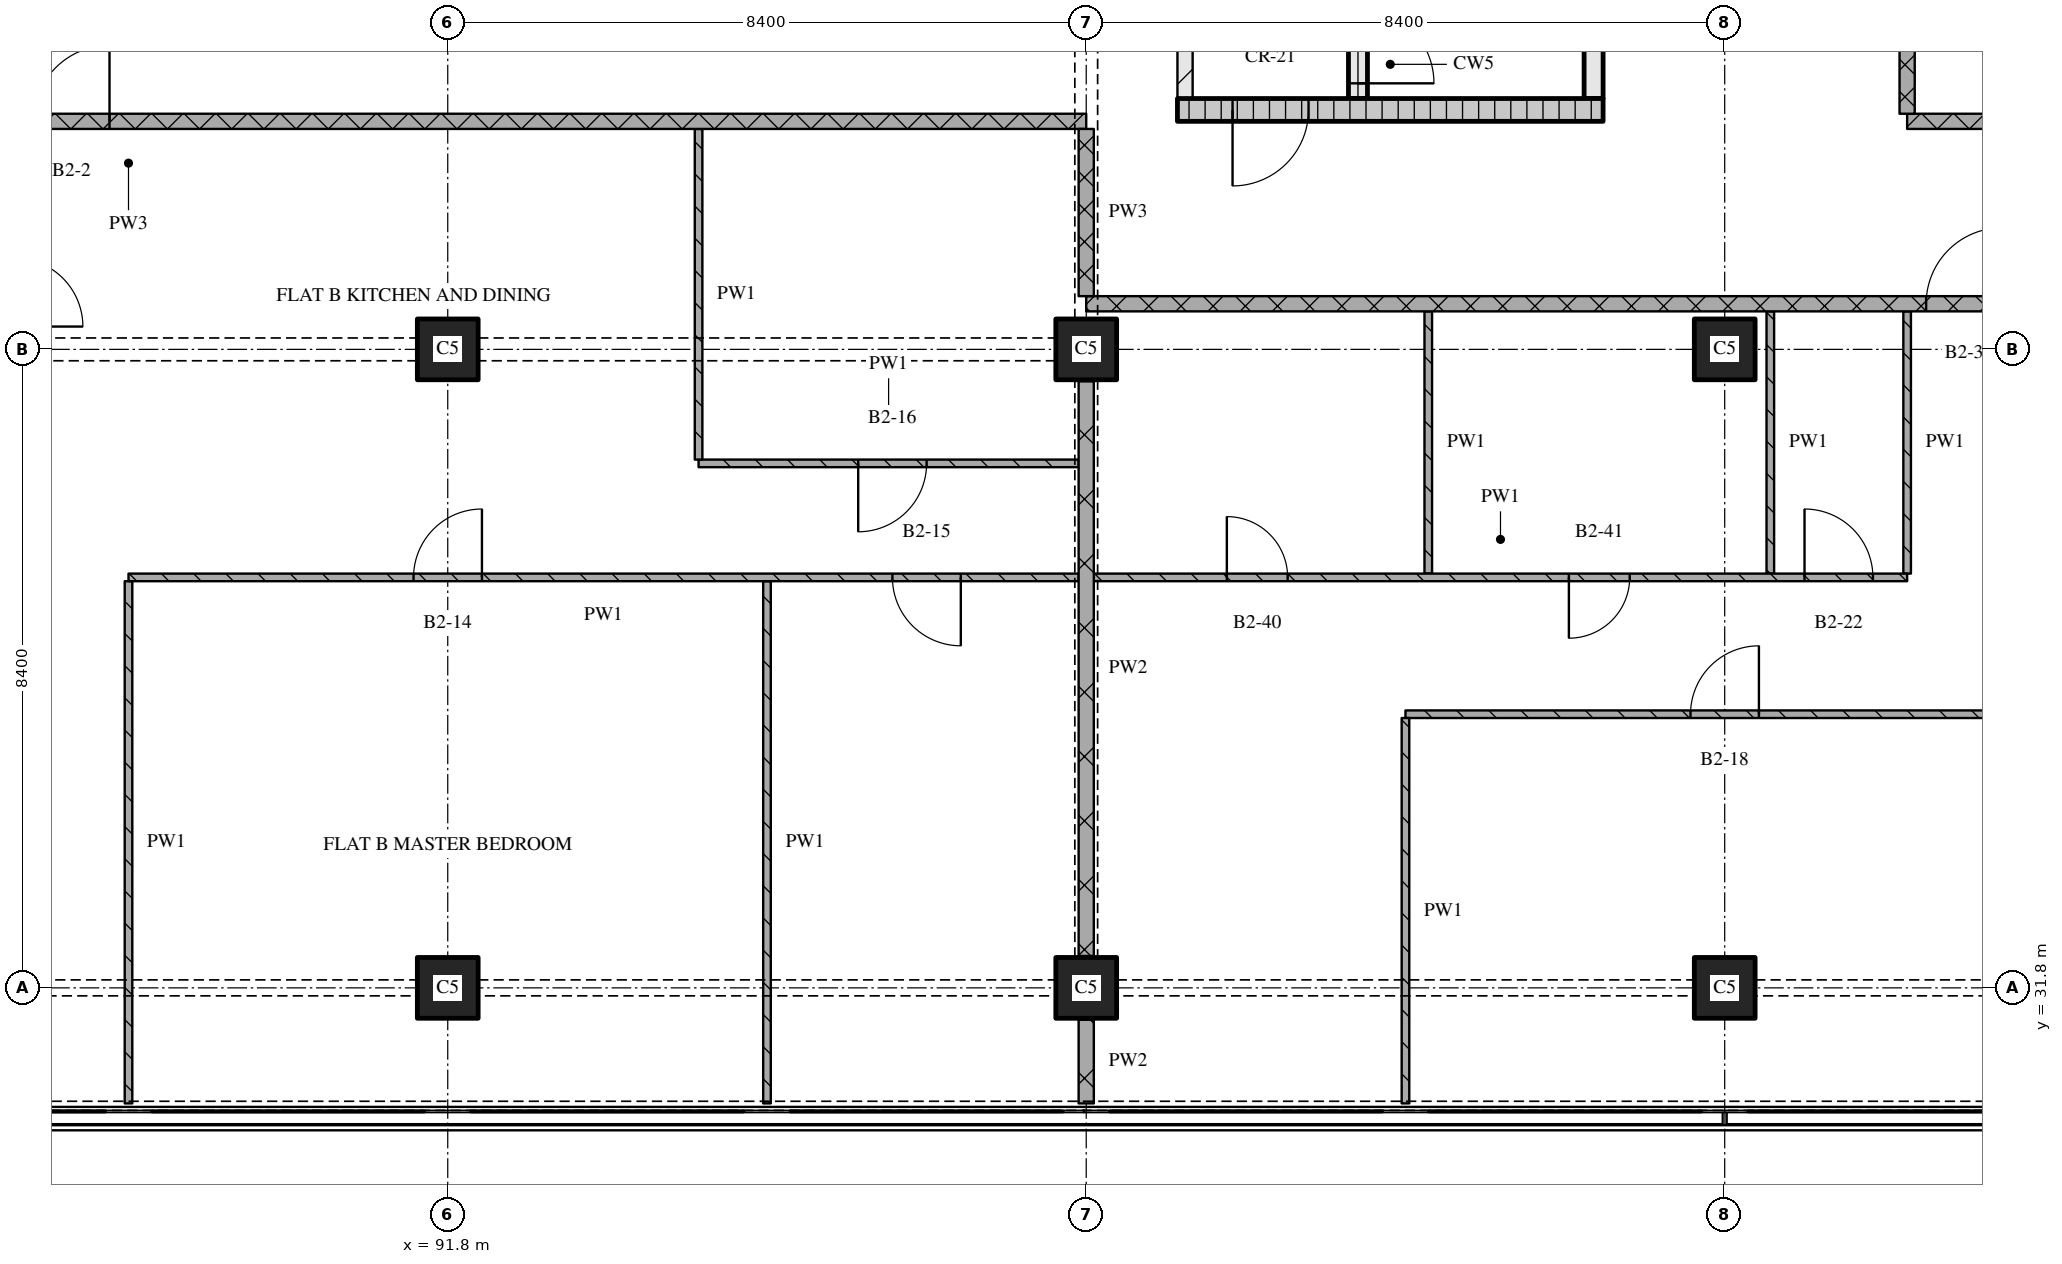
"""IFC4 building model, lengths in metres.
Left out: names, types, materials, properties, quantities, classifications, styles, units other than length and angle.
Written with IfcOpenShell. Run it as: python <this file> out.ifc"""

import sys

from ifc_helpers import new_model, si_unit, direction, frame, frame_2d, origin, origin_2d, place, context, subcontext, project, spatial, rectangle, extrude, element, fill, save


model = new_model("IFC4")
c1 = context("Model", 3, precision=1e-05, world=origin(), true_north=direction((0.0, 1.0)))
c2 = subcontext(c1, "Body", "Model", "MODEL_VIEW")
j1 = project(units=[si_unit("LENGTHUNIT", "METRE"), si_unit("PLANEANGLEUNIT", "RADIAN")], contexts=[c1])
p1 = place(None, origin())
s1 = spatial("IfcSite", under=j1, at=p1, CompositionType="ELEMENT")
p2 = place(p1, origin())
s2 = spatial("IfcBuilding", under=s1, at=p2, CompositionType="ELEMENT")
p3 = place(p2, frame((0.0, 0.0, 106.05)))
s3 = spatial("IfcBuildingStorey", under=s2, at=p3, CompositionType="ELEMENT", Elevation=106.05)
for number, where, z_axis, x_axis in (
    (1, (91.8, 31.8, 0.0), (0.0, 0.0, 1.0), (1.0, 0.0, 0.0)),
    (2, (91.8, 40.2, 0.0), (0.0, 0.0, 1.0), (1.0, 0.0, 0.0)),
    (3, (100.2, 31.8, 0.0), (0.0, 0.0, 1.0), (1.0, 0.0, 0.0)),
    (4, (100.2, 40.2, 0.0), (0.0, 0.0, 1.0), (1.0, 0.0, 0.0)),
    (5, (108.6, 31.8, 0.0), (0.0, 0.0, 1.0), (1.0, 0.0, 0.0)),
    (6, (108.6, 40.2, 0.0), (0.0, 0.0, 1.0), (1.0, 0.0, 0.0)),
):
    element("IfcColumn", number, at=place(p3, frame(where, z_axis=z_axis, x_axis=x_axis)), inside=s3, PredefinedType="COLUMN", context=c2, shape_type="SweptSolid", body=[
        extrude(rectangle(XDim=0.8, YDim=0.8, at=origin_2d()), origin(), (0.0, 0.0, 1.0), 3.6),
    ])
p4 = place(p3, frame((101.4, 43.35, 0.0), z_axis=(0.0, 0.0, 1.0), x_axis=(1.0, 0.0, 0.0)))
e7 = element("IfcWall", 7, at=p4, inside=s3, PredefinedType="SOLIDWALL", context=c2, shape_type="SweptSolid", body=[
    extrude(rectangle(XDim=5.6, YDim=0.3, at=frame_2d((2.8, 0.0))), origin(), (0.0, 0.0, 1.0), 3.32),
])
p5 = place(p4, frame((0.725, 0.0, 0.0)))
e8 = element("IfcOpeningElement", 8, at=p5, cuts=e7, PredefinedType="OPENING", context=c2, shape_type="SweptSolid", body=[
    extrude(rectangle(XDim=1.0, YDim=2.1, at=frame_2d((0.5, 1.05))), frame((0.0, 0.16, 0.0), z_axis=(0.0, -1.0, 0.0), x_axis=(1.0, 0.0, 0.0)), (0.0, 0.0, 1.0), 0.32),
])
p6 = place(p3, frame((101.5, 43.5, 0.0), z_axis=(0.0, 0.0, 1.0), x_axis=(0.0, 1.0, 0.0)))
e9 = element("IfcWall", 9, at=p6, inside=s3, PredefinedType="PARTITIONING", context=c2, shape_type="SweptSolid", body=[
    extrude(rectangle(XDim=6.9, YDim=0.2, at=frame_2d((3.45, 0.0))), origin(), (0.0, 0.0, 1.0), 3.32),
])
p7 = place(p6, frame((1.0, 0.0, 0.0)))
e10 = element("IfcOpeningElement", 10, at=p7, cuts=e9, PredefinedType="OPENING", context=c2, shape_type="SweptSolid", body=[
    extrude(rectangle(XDim=1.0, YDim=2.1, at=frame_2d((0.5, 1.05))), frame((0.0, 0.11, 0.0), z_axis=(0.0, -1.0, 0.0), x_axis=(1.0, 0.0, 0.0)), (0.0, 0.0, 1.0), 0.22),
])
p8 = place(p3, frame((103.775, 43.5, 0.0), z_axis=(0.0, 0.0, 1.0), x_axis=(0.0, 1.0, 0.0)))
e11 = element("IfcWall", 11, at=p8, inside=s3, PredefinedType="SOLIDWALL", context=c2, shape_type="SweptSolid", body=[
    extrude(rectangle(XDim=6.9, YDim=0.25, at=frame_2d((3.45, 0.0))), origin(), (0.0, 0.0, 1.0), 3.32),
])
p9 = place(p8, frame((0.2, 0.0, 0.0)))
e12 = element("IfcOpeningElement", 12, at=p9, cuts=e11, PredefinedType="OPENING", context=c2, shape_type="SweptSolid", body=[
    extrude(rectangle(XDim=1.0, YDim=2.1, at=frame_2d((0.5, 1.05))), frame((0.0, 0.135, 0.0), z_axis=(0.0, -1.0, 0.0), x_axis=(1.0, 0.0, 0.0)), (0.0, 0.0, 1.0), 0.27),
])
p10 = place(p3, frame((106.875, 43.5, 0.0), z_axis=(0.0, 0.0, 1.0), x_axis=(0.0, 1.0, 0.0)))
e13 = element("IfcWall", 13, at=p10, inside=s3, PredefinedType="SOLIDWALL", context=c2, shape_type="SweptSolid", body=[
    extrude(rectangle(XDim=6.9, YDim=0.25, at=frame_2d((3.45, 0.0))), origin(), (0.0, 0.0, 1.0), 3.32),
])
p11 = place(p3, frame((126.92, 35.4, 0.0), z_axis=(0.0, 0.0, 1.0), x_axis=(-1.0, 0.0, 0.0)))
e14 = element("IfcWall", 14, at=p11, inside=s3, PredefinedType="PARTITIONING", context=c2, shape_type="SweptSolid", body=[
    extrude(rectangle(XDim=22.52, YDim=0.1, at=frame_2d((11.26, 0.0))), origin(), (0.0, 0.0, 1.0), 3.32),
])
p12 = place(p11, frame((3.346, 0.0, 0.0)))
e15 = element("IfcOpeningElement", 15, at=p12, cuts=e14, PredefinedType="OPENING", context=c2, shape_type="SweptSolid", body=[
    extrude(rectangle(XDim=0.9, YDim=2.1, at=frame_2d((0.45, 1.05))), frame((0.0, 0.06, 0.0), z_axis=(0.0, -1.0, 0.0), x_axis=(1.0, 0.0, 0.0)), (0.0, 0.0, 1.0), 0.12),
])
p13 = place(p11, frame((9.47, 0.0, 0.0)))
e16 = element("IfcOpeningElement", 16, at=p13, cuts=e14, PredefinedType="OPENING", context=c2, shape_type="SweptSolid", body=[
    extrude(rectangle(XDim=0.9, YDim=2.1, at=frame_2d((0.45, 1.05))), frame((0.0, 0.06, 0.0), z_axis=(0.0, -1.0, 0.0), x_axis=(1.0, 0.0, 0.0)), (0.0, 0.0, 1.0), 0.12),
])
p14 = place(p11, frame((17.87, 0.0, 0.0)))
e17 = element("IfcOpeningElement", 17, at=p14, cuts=e14, PredefinedType="OPENING", context=c2, shape_type="SweptSolid", body=[
    extrude(rectangle(XDim=0.9, YDim=2.1, at=frame_2d((0.45, 1.05))), frame((0.0, 0.06, 0.0), z_axis=(0.0, -1.0, 0.0), x_axis=(1.0, 0.0, 0.0)), (0.0, 0.0, 1.0), 0.12),
])
p15 = place(p3, frame((95.1, 38.7, 0.0), z_axis=(0.0, 0.0, 1.0), x_axis=(1.0, 0.0, 0.0)))
e18 = element("IfcWall", 18, at=p15, inside=s3, PredefinedType="PARTITIONING", context=c2, shape_type="SweptSolid", body=[
    extrude(rectangle(XDim=5.0, YDim=0.1, at=frame_2d((2.5, 0.0))), origin(), (0.0, 0.0, 1.0), 3.32),
])
p16 = place(p15, frame((2.1, 0.0, 0.0)))
e19 = element("IfcOpeningElement", 19, at=p16, cuts=e18, PredefinedType="OPENING", context=c2, shape_type="SweptSolid", body=[
    extrude(rectangle(XDim=0.9, YDim=2.1, at=frame_2d((0.45, 1.05))), frame((0.0, 0.06, 0.0), z_axis=(0.0, -1.0, 0.0), x_axis=(1.0, 0.0, 0.0)), (0.0, 0.0, 1.0), 0.12),
])
p17 = place(p3, frame((124.38, 40.8, 0.0), z_axis=(0.0, 0.0, 1.0), x_axis=(-1.0, 0.0, 0.0)))
e20 = element("IfcWall", 20, at=p17, inside=s3, PredefinedType="PARTITIONING", context=c2, shape_type="SweptSolid", body=[
    extrude(rectangle(XDim=24.18, YDim=0.2, at=frame_2d((12.09, 0.0))), origin(), (0.0, 0.0, 1.0), 3.32),
])
p18 = place(p17, frame((12.13, 0.0, 0.0)))
e21 = element("IfcOpeningElement", 21, at=p18, cuts=e20, PredefinedType="OPENING", context=c2, shape_type="SweptSolid", body=[
    extrude(rectangle(XDim=1.0, YDim=2.1, at=frame_2d((0.5, 1.05))), frame((0.0, 0.11, 0.0), z_axis=(0.0, -1.0, 0.0), x_axis=(1.0, 0.0, 0.0)), (0.0, 0.0, 1.0), 0.22),
])
p19 = place(p3, frame((100.2, 43.2, 0.0), z_axis=(0.0, 0.0, 1.0), x_axis=(-1.0, 0.0, 0.0)))
e22 = element("IfcWall", 22, at=p19, inside=s3, PredefinedType="PARTITIONING", context=c2, shape_type="SweptSolid", body=[
    extrude(rectangle(XDim=25.2, YDim=0.2, at=frame_2d((12.6, 0.0))), origin(), (0.0, 0.0, 1.0), 3.32),
])
p20 = place(p19, frame((12.85, 0.0, 0.0)))
e23 = element("IfcOpeningElement", 23, at=p20, cuts=e22, PredefinedType="OPENING", context=c2, shape_type="SweptSolid", body=[
    extrude(rectangle(XDim=1.0, YDim=2.1, at=frame_2d((0.5, 1.05))), frame((0.0, 0.11, 0.0), z_axis=(0.0, -1.0, 0.0), x_axis=(1.0, 0.0, 0.0)), (0.0, 0.0, 1.0), 0.22),
])
p21 = place(p3, frame((111.0, 43.2, 0.0), z_axis=(0.0, 0.0, 1.0), x_axis=(1.0, 0.0, 0.0)))
e24 = element("IfcWall", 24, at=p21, inside=s3, PredefinedType="PARTITIONING", context=c2, shape_type="SweptSolid", body=[
    extrude(rectangle(XDim=15.92, YDim=0.2, at=frame_2d((7.96, 0.0))), origin(), (0.0, 0.0, 1.0), 3.32),
])
p22 = place(p3, frame((87.6, 37.15, 0.0), z_axis=(0.0, 0.0, 1.0), x_axis=(0.0, -1.0, 0.0)))
e25 = element("IfcWall", 25, at=p22, inside=s3, PredefinedType="PARTITIONING", context=c2, shape_type="SweptSolid", body=[
    extrude(rectangle(XDim=6.87, YDim=0.1, at=frame_2d((3.435, 0.0))), origin(), (0.0, 0.0, 1.0), 3.32),
])
p23 = place(p3, frame((95.1, 43.1, 0.0), z_axis=(0.0, 0.0, 1.0), x_axis=(0.0, -1.0, 0.0)))
e26 = element("IfcWall", 26, at=p23, inside=s3, PredefinedType="PARTITIONING", context=c2, shape_type="SweptSolid", body=[
    extrude(rectangle(XDim=4.35, YDim=0.1, at=frame_2d((2.175, 0.0))), origin(), (0.0, 0.0, 1.0), 3.32),
])
p24 = place(p3, frame((96.0, 37.15, 0.0), z_axis=(0.0, 0.0, 1.0), x_axis=(0.0, -1.0, 0.0)))
e27 = element("IfcWall", 27, at=p24, inside=s3, PredefinedType="PARTITIONING", context=c2, shape_type="SweptSolid", body=[
    extrude(rectangle(XDim=6.87, YDim=0.1, at=frame_2d((3.435, 0.0))), origin(), (0.0, 0.0, 1.0), 3.32),
])
p25 = place(p3, frame((100.2, 43.1, 0.0), z_axis=(0.0, 0.0, 1.0), x_axis=(0.0, -1.0, 0.0)))
e28 = element("IfcWall", 28, at=p25, inside=s3, PredefinedType="PARTITIONING", context=c2, shape_type="SweptSolid", body=[
    extrude(rectangle(XDim=2.2, YDim=0.2, at=frame_2d((1.1, 0.0))), origin(), (0.0, 0.0, 1.0), 2.43),
])
p26 = place(p3, frame((100.2, 31.38, 0.0), z_axis=(0.0, 0.0, 1.0), x_axis=(0.0, -1.0, 0.0)))
e29 = element("IfcWall", 29, at=p26, inside=s3, PredefinedType="PARTITIONING", context=c2, shape_type="SweptSolid", body=[
    extrude(rectangle(XDim=1.1, YDim=0.2, at=frame_2d((0.55, 0.0))), origin(), (0.0, 0.0, 1.0), 3.32),
])
p27 = place(p3, frame((100.2, 39.78, 0.0), z_axis=(0.0, 0.0, 1.0), x_axis=(0.0, -1.0, 0.0)))
e30 = element("IfcWall", 30, at=p27, inside=s3, PredefinedType="PARTITIONING", context=c2, shape_type="SweptSolid", body=[
    extrude(rectangle(XDim=7.56, YDim=0.2, at=frame_2d((3.78, 0.0))), origin(), (0.0, 0.0, 1.0), 2.83),
])
p28 = place(p3, frame((104.4, 35.35, 0.0), z_axis=(0.0, 0.0, 1.0), x_axis=(0.0, -1.0, 0.0)))
e31 = element("IfcWall", 31, at=p28, inside=s3, PredefinedType="PARTITIONING", context=c2, shape_type="SweptSolid", body=[
    extrude(rectangle(XDim=5.07, YDim=0.1, at=frame_2d((2.535, 0.0))), origin(), (0.0, 0.0, 1.0), 3.32),
])
for number, where, z_axis, x_axis in (
    (32, (104.7, 40.7, 0.0), (0.0, 0.0, 1.0), (0.0, -1.0, 0.0)),
    (33, (109.2, 40.7, 0.0), (0.0, 0.0, 1.0), (0.0, -1.0, 0.0)),
):
    element("IfcWall", number, at=place(p3, frame(where, z_axis=z_axis, x_axis=x_axis)), inside=s3, PredefinedType="PARTITIONING", context=c2, shape_type="SweptSolid", body=[
        extrude(rectangle(XDim=3.45, YDim=0.1, at=frame_2d((1.725, 0.0))), origin(), (0.0, 0.0, 1.0), 3.32),
    ])
p29 = place(p3, frame((111.0, 75.32, 0.0), z_axis=(0.0, 0.0, 1.0), x_axis=(0.0, -1.0, 0.0)))
e34 = element("IfcWall", 34, at=p29, inside=s3, PredefinedType="PARTITIONING", context=c2, shape_type="SweptSolid", body=[
    extrude(rectangle(XDim=32.02, YDim=0.2, at=frame_2d((16.01, 0.0))), origin(), (0.0, 0.0, 1.0), 3.32),
])
p30 = place(p29, frame((3.87, 0.0, 0.0)))
e35 = element("IfcOpeningElement", 35, at=p30, cuts=e34, PredefinedType="OPENING", context=c2, shape_type="SweptSolid", body=[
    extrude(rectangle(XDim=1.0, YDim=2.1, at=frame_2d((0.5, 1.05))), frame((0.0, 0.11, 0.0), z_axis=(0.0, -1.0, 0.0), x_axis=(1.0, 0.0, 0.0)), (0.0, 0.0, 1.0), 0.22),
])
p31 = place(p29, frame((20.67, 0.0, 0.0)))
e36 = element("IfcOpeningElement", 36, at=p31, cuts=e34, PredefinedType="OPENING", context=c2, shape_type="SweptSolid", body=[
    extrude(rectangle(XDim=1.0, YDim=2.1, at=frame_2d((0.5, 1.05))), frame((0.0, 0.11, 0.0), z_axis=(0.0, -1.0, 0.0), x_axis=(1.0, 0.0, 0.0)), (0.0, 0.0, 1.0), 0.22),
])
p32 = place(p3, frame((111.0, 40.7, 0.0), z_axis=(0.0, 0.0, 1.0), x_axis=(0.0, -1.0, 0.0)))
e37 = element("IfcWall", 37, at=p32, inside=s3, PredefinedType="PARTITIONING", context=c2, shape_type="SweptSolid", body=[
    extrude(rectangle(XDim=3.45, YDim=0.1, at=frame_2d((1.725, 0.0))), origin(), (0.0, 0.0, 1.0), 3.32),
])
p33 = place(p3, frame((100.1, 37.2, 0.0), z_axis=(0.0, 0.0, 1.0), x_axis=(-1.0, 0.0, 0.0)))
e38 = element("IfcWall", 38, at=p33, inside=s3, PredefinedType="PARTITIONING", context=c2, shape_type="SweptSolid", body=[
    extrude(rectangle(XDim=12.5, YDim=0.1, at=frame_2d((6.25, 0.0))), origin(), (0.0, 0.0, 1.0), 3.32),
])
p34 = place(p33, frame((1.55, 0.0, 0.0)))
e39 = element("IfcOpeningElement", 39, at=p34, cuts=e38, PredefinedType="OPENING", context=c2, shape_type="SweptSolid", body=[
    extrude(rectangle(XDim=0.9, YDim=2.1, at=frame_2d((0.45, 1.05))), frame((0.0, 0.06, 0.0), z_axis=(0.0, -1.0, 0.0), x_axis=(1.0, 0.0, 0.0)), (0.0, 0.0, 1.0), 0.12),
])
p35 = place(p33, frame((7.85, 0.0, 0.0)))
e40 = element("IfcOpeningElement", 40, at=p35, cuts=e38, PredefinedType="OPENING", context=c2, shape_type="SweptSolid", body=[
    extrude(rectangle(XDim=0.9, YDim=2.1, at=frame_2d((0.45, 1.05))), frame((0.0, 0.06, 0.0), z_axis=(0.0, -1.0, 0.0), x_axis=(1.0, 0.0, 0.0)), (0.0, 0.0, 1.0), 0.12),
])
p36 = place(p3, frame((100.3, 37.2, 0.0), z_axis=(0.0, 0.0, 1.0), x_axis=(1.0, 0.0, 0.0)))
e41 = element("IfcWall", 41, at=p36, inside=s3, PredefinedType="PARTITIONING", context=c2, shape_type="SweptSolid", body=[
    extrude(rectangle(XDim=10.7, YDim=0.1, at=frame_2d((5.35, 0.0))), origin(), (0.0, 0.0, 1.0), 3.32),
])
p37 = place(p36, frame((1.75, 0.0, 0.0)))
e42 = element("IfcOpeningElement", 42, at=p37, cuts=e41, PredefinedType="OPENING", context=c2, shape_type="SweptSolid", body=[
    extrude(rectangle(XDim=0.8, YDim=2.1, at=frame_2d((0.4, 1.05))), frame((0.0, 0.06, 0.0), z_axis=(0.0, -1.0, 0.0), x_axis=(1.0, 0.0, 0.0)), (0.0, 0.0, 1.0), 0.12),
])
p38 = place(p36, frame((6.25, 0.0, 0.0)))
e43 = element("IfcOpeningElement", 43, at=p38, cuts=e41, PredefinedType="OPENING", context=c2, shape_type="SweptSolid", body=[
    extrude(rectangle(XDim=0.8, YDim=2.1, at=frame_2d((0.4, 1.05))), frame((0.0, 0.06, 0.0), z_axis=(0.0, -1.0, 0.0), x_axis=(1.0, 0.0, 0.0)), (0.0, 0.0, 1.0), 0.12),
])
p39 = place(p36, frame((9.35, 0.0, 0.0)))
e44 = element("IfcOpeningElement", 44, at=p39, cuts=e41, PredefinedType="OPENING", context=c2, shape_type="SweptSolid", body=[
    extrude(rectangle(XDim=0.9, YDim=2.1, at=frame_2d((0.45, 1.05))), frame((0.0, 0.06, 0.0), z_axis=(0.0, -1.0, 0.0), x_axis=(1.0, 0.0, 0.0)), (0.0, 0.0, 1.0), 0.12),
])
p40 = place(p5, origin())
e45 = element("IfcDoor", 45, at=p40, inside=s3, OperationType="SINGLE_SWING_RIGHT", PredefinedType="DOOR", context=c2, shape_type="SweptSolid", body=[
    extrude(rectangle(XDim=1.0, YDim=2.1, at=frame_2d((0.5, 1.05))), frame((0.0, 0.025, 0.0), z_axis=(0.0, -1.0, 0.0), x_axis=(1.0, 0.0, 0.0)), (0.0, 0.0, 1.0), 0.05),
])
fill(e8, e45)
p41 = place(p9, origin())
e46 = element("IfcDoor", 46, at=p41, inside=s3, OperationType="SINGLE_SWING_RIGHT", PredefinedType="DOOR", context=c2, shape_type="SweptSolid", body=[
    extrude(rectangle(XDim=1.0, YDim=2.1, at=frame_2d((0.5, 1.05))), frame((0.0, 0.025, 0.0), z_axis=(0.0, -1.0, 0.0), x_axis=(1.0, 0.0, 0.0)), (0.0, 0.0, 1.0), 0.05),
])
fill(e12, e46)
p42 = place(p14, origin())
e47 = element("IfcDoor", 47, at=p42, inside=s3, OperationType="SINGLE_SWING_RIGHT", PredefinedType="DOOR", context=c2, shape_type="SweptSolid", body=[
    extrude(rectangle(XDim=0.9, YDim=2.1, at=frame_2d((0.45, 1.05))), frame((0.0, 0.025, 0.0), z_axis=(0.0, -1.0, 0.0), x_axis=(1.0, 0.0, 0.0)), (0.0, 0.0, 1.0), 0.05),
])
fill(e17, e47)
p43 = place(p16, origin())
e48 = element("IfcDoor", 48, at=p43, inside=s3, OperationType="SINGLE_SWING_RIGHT", PredefinedType="DOOR", context=c2, shape_type="SweptSolid", body=[
    extrude(rectangle(XDim=0.9, YDim=2.1, at=frame_2d((0.45, 1.05))), frame((0.0, 0.025, 0.0), z_axis=(0.0, -1.0, 0.0), x_axis=(1.0, 0.0, 0.0)), (0.0, 0.0, 1.0), 0.05),
])
fill(e19, e48)
p44 = place(p18, origin())
e49 = element("IfcDoor", 49, at=p44, inside=s3, OperationType="SINGLE_SWING_RIGHT", PredefinedType="DOOR", context=c2, shape_type="SweptSolid", body=[
    extrude(rectangle(XDim=1.0, YDim=2.1, at=frame_2d((0.5, 1.05))), frame((0.0, 0.025, 0.0), z_axis=(0.0, -1.0, 0.0), x_axis=(1.0, 0.0, 0.0)), (0.0, 0.0, 1.0), 0.05),
])
fill(e21, e49)
p45 = place(p20, origin())
e50 = element("IfcDoor", 50, at=p45, inside=s3, OperationType="SINGLE_SWING_RIGHT", PredefinedType="DOOR", context=c2, shape_type="SweptSolid", body=[
    extrude(rectangle(XDim=1.0, YDim=2.1, at=frame_2d((0.5, 1.05))), frame((0.0, 0.025, 0.0), z_axis=(0.0, -1.0, 0.0), x_axis=(1.0, 0.0, 0.0)), (0.0, 0.0, 1.0), 0.05),
])
fill(e23, e50)
p46 = place(p34, origin())
e51 = element("IfcDoor", 51, at=p46, inside=s3, OperationType="SINGLE_SWING_LEFT", PredefinedType="DOOR", context=c2, shape_type="SweptSolid", body=[
    extrude(rectangle(XDim=0.9, YDim=2.1, at=frame_2d((0.45, 1.05))), frame((0.0, 0.025, 0.0), z_axis=(0.0, -1.0, 0.0), x_axis=(1.0, 0.0, 0.0)), (0.0, 0.0, 1.0), 0.05),
])
fill(e39, e51)
p47 = place(p35, origin())
e52 = element("IfcDoor", 52, at=p47, inside=s3, OperationType="SINGLE_SWING_RIGHT", PredefinedType="DOOR", context=c2, shape_type="SweptSolid", body=[
    extrude(rectangle(XDim=0.9, YDim=2.1, at=frame_2d((0.45, 1.05))), frame((0.0, 0.025, 0.0), z_axis=(0.0, -1.0, 0.0), x_axis=(1.0, 0.0, 0.0)), (0.0, 0.0, 1.0), 0.05),
])
fill(e40, e52)
p48 = place(p37, origin())
e53 = element("IfcDoor", 53, at=p48, inside=s3, OperationType="SINGLE_SWING_LEFT", PredefinedType="DOOR", context=c2, shape_type="SweptSolid", body=[
    extrude(rectangle(XDim=0.8, YDim=2.1, at=frame_2d((0.4, 1.05))), frame((0.0, 0.025, 0.0), z_axis=(0.0, -1.0, 0.0), x_axis=(1.0, 0.0, 0.0)), (0.0, 0.0, 1.0), 0.05),
])
fill(e42, e53)
p49 = place(p38, origin())
e54 = element("IfcDoor", 54, at=p49, inside=s3, OperationType="SINGLE_SWING_RIGHT", PredefinedType="DOOR", context=c2, shape_type="SweptSolid", body=[
    extrude(rectangle(XDim=0.8, YDim=2.1, at=frame_2d((0.4, 1.05))), frame((0.0, 0.025, 0.0), z_axis=(0.0, -1.0, 0.0), x_axis=(1.0, 0.0, 0.0)), (0.0, 0.0, 1.0), 0.05),
])
fill(e43, e54)
p50 = place(p39, origin())
e55 = element("IfcDoor", 55, at=p50, inside=s3, OperationType="SINGLE_SWING_LEFT", PredefinedType="DOOR", context=c2, shape_type="SweptSolid", body=[
    extrude(rectangle(XDim=0.9, YDim=2.1, at=frame_2d((0.45, 1.05))), frame((0.0, 0.025, 0.0), z_axis=(0.0, -1.0, 0.0), x_axis=(1.0, 0.0, 0.0)), (0.0, 0.0, 1.0), 0.05),
])
fill(e44, e55)
save(model, sys.argv[1])
